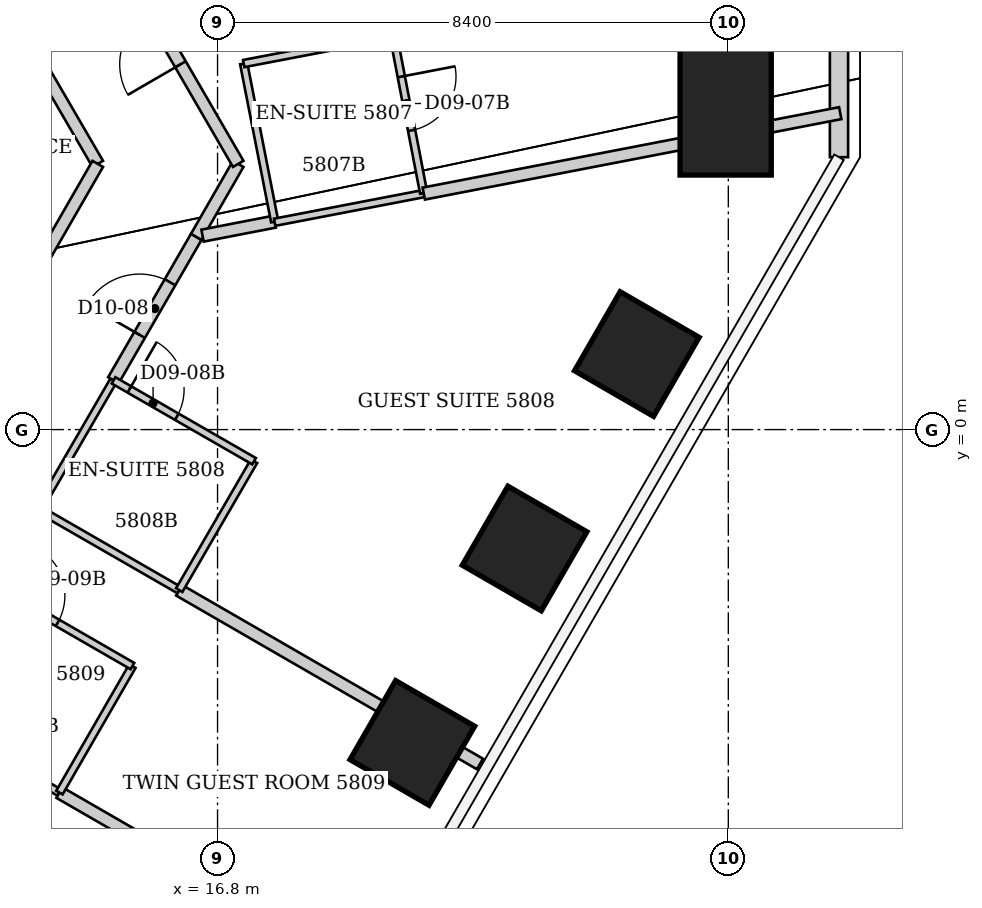
"""IFC4 building model, lengths in metres.
Left out: names, types, materials, properties, quantities, classifications, styles, units other than length and angle.
Written with IfcOpenShell. Run it as: python <this file> out.ifc"""

import sys

from ifc_helpers import new_model, si_unit, direction, frame, frame_2d, origin, origin_2d, place, context, subcontext, project, spatial, rectangle, extrude, element, fill, save


model = new_model("IFC4")
c1 = context("Model", 3, precision=1e-05, world=origin(), true_north=direction((0.0, 1.0)))
c2 = subcontext(c1, "Body", "Model", "MODEL_VIEW")
j1 = project(units=[si_unit("LENGTHUNIT", "METRE"), si_unit("PLANEANGLEUNIT", "RADIAN")], contexts=[c1])
p1 = place(None, origin())
s1 = spatial("IfcSite", under=j1, at=p1, CompositionType="ELEMENT")
p2 = place(p1, origin())
s2 = spatial("IfcBuilding", under=s1, at=p2, CompositionType="ELEMENT")
p3 = place(p2, frame((0.0, 0.0, 232.6)))
s3 = spatial("IfcBuildingStorey", under=s2, at=p3, CompositionType="ELEMENT", Elevation=232.6)
p4 = place(p3, frame((25.156, 5.311, -0.069), z_axis=(-0.069494626315, -0.014666891242, 0.997474500534), x_axis=(0.997582322762, -0.001100831088, 0.069485951703)))
e1 = element("IfcColumn", 1, at=p4, inside=s3, PredefinedType="COLUMN", context=c2, shape_type="SweptSolid", body=[
    extrude(rectangle(XDim=1.5, YDim=2.25, at=origin_2d()), origin(), (0.0, 0.0, 1.0), 3.878),
])
p5 = place(p3, frame((23.696, 1.242, -0.068), z_axis=(-0.064946488334, -0.003401658943, 0.997882950235), x_axis=(0.86374544839, -0.500971680077, 0.05450849609)))
e2 = element("IfcColumn", 2, at=p5, inside=s3, PredefinedType="COLUMN", context=c2, shape_type="SweptSolid", body=[
    extrude(rectangle(XDim=1.5, YDim=1.5, at=origin_2d()), origin(), (0.0, 0.0, 1.0), 3.876),
])
p6 = place(p3, frame((21.85, -1.956, -0.06), z_axis=(-0.059916592272, 0.005366607316, 0.998188960817), x_axis=(0.864010481445, -0.500509554821, 0.054553400319)))
e3 = element("IfcColumn", 3, at=p6, inside=s3, PredefinedType="COLUMN", context=c2, shape_type="SweptSolid", body=[
    extrude(rectangle(XDim=1.5, YDim=1.5, at=origin_2d()), origin(), (0.0, 0.0, 1.0), 3.867),
])
p7 = place(p3, frame((20.003, -5.153, -0.052), z_axis=(-0.054858228661, 0.014110017291, 0.998394452188), x_axis=(0.86451511653, -0.499636332881, 0.054563249145)))
e4 = element("IfcColumn", 4, at=p7, inside=s3, PredefinedType="COLUMN", context=c2, shape_type="SweptSolid", body=[
    extrude(rectangle(XDim=1.5, YDim=1.5, at=origin_2d()), origin(), (0.0, 0.0, 1.0), 3.858),
])
p8 = place(p3, frame((27.02, 6.25, 0.0), z_axis=(0.0, 0.0, 1.0), x_axis=(0.0, -1.0, 0.0)))
e5 = element("IfcWall", 5, at=p8, inside=s3, PredefinedType="SOLIDWALL", context=c2, shape_type="SweptSolid", body=[
    extrude(rectangle(XDim=1.77, YDim=0.3, at=frame_2d((0.885, 0.0))), origin(), (0.0, 0.0, 1.0), 3.64),
])
p9 = place(p3, frame((11.93, -4.66, 0.0), z_axis=(0.0, 0.0, 1.0), x_axis=(0.865969958829, -0.500096021185, 0.0)))
e6 = element("IfcWall", 6, at=p9, inside=s3, PredefinedType="PARTITIONING", context=c2, shape_type="SweptSolid", body=[
    extrude(rectangle(XDim=2.621, YDim=0.12, at=frame_2d((1.311, 0.0))), origin(), (0.0, 0.0, 1.0), 3.64),
])
p10 = place(p3, frame((13.83, 6.09, 0.0), z_axis=(0.0, 0.0, 1.0), x_axis=(0.502573539539, -0.864534462792, 0.0)))
e7 = element("IfcWall", 7, at=p10, inside=s3, PredefinedType="PARTITIONING", context=c2, shape_type="SweptSolid", body=[
    extrude(rectangle(XDim=1.99, YDim=0.2, at=frame_2d((0.995, 0.0))), origin(), (0.0, 0.0, 1.0), 3.64),
])
p11 = place(p3, frame((13.86, -1.31, 0.0), z_axis=(0.0, 0.0, 1.0), x_axis=(0.501813488763, 0.864975850817, 0.0)))
e8 = element("IfcWall", 8, at=p11, inside=s3, PredefinedType="PARTITIONING", context=c2, shape_type="SweptSolid", body=[
    extrude(rectangle(XDim=2.451, YDim=0.12, at=frame_2d((1.226, 0.0))), origin(), (0.0, 0.0, 1.0), 3.64),
])
p12 = place(p3, frame((14.2, -5.971, 0.0), z_axis=(0.0, 0.0, 1.0), x_axis=(0.86600340545, -0.500038100297, 0.0)))
e9 = element("IfcWall", 9, at=p12, inside=s3, PredefinedType="PARTITIONING", context=c2, shape_type="SweptSolid", body=[
    extrude(rectangle(XDim=5.758, YDim=0.2, at=frame_2d((2.879, 0.0))), origin(), (0.0, 0.0, 1.0), 3.64),
])
p13 = place(p3, frame((14.2, -5.97, 0.0), z_axis=(0.0, 0.0, 1.0), x_axis=(0.499737123639, 0.866177122335, 0.0)))
e10 = element("IfcWall", 10, at=p13, inside=s3, PredefinedType="PARTITIONING", context=c2, shape_type="SweptSolid", body=[
    extrude(rectangle(XDim=2.401, YDim=0.12, at=frame_2d((1.201, 0.0))), origin(), (0.0, 0.0, 1.0), 3.64),
])
p14 = place(p3, frame((14.83, 4.37, 0.0), z_axis=(0.0, 0.0, 1.0), x_axis=(-0.498775186059, -0.866731396554, 0.0)))
e11 = element("IfcWall", 11, at=p14, inside=s3, PredefinedType="PARTITIONING", context=c2, shape_type="SweptSolid", body=[
    extrude(rectangle(XDim=3.288, YDim=0.2, at=frame_2d((1.644, 0.0))), origin(), (0.0, 0.0, 1.0), 3.64),
])
p15 = place(p3, frame((15.088, 0.811, 0.0), z_axis=(0.0, 0.0, 1.0), x_axis=(0.500149166734, 0.8659392652, 0.0)))
e12 = element("IfcWall", 12, at=p15, inside=s3, PredefinedType="PARTITIONING", context=c2, shape_type="SweptSolid", body=[
    extrude(rectangle(XDim=2.724, YDim=0.2, at=frame_2d((1.362, 0.0))), origin(), (0.0, 0.0, 1.0), 3.64),
])
p16 = place(p15, frame((0.862, 0.0, 0.0)))
e13 = element("IfcOpeningElement", 13, at=p16, cuts=e12, PredefinedType="OPENING", context=c2, shape_type="SweptSolid", body=[
    extrude(rectangle(XDim=1.0, YDim=2.13, at=frame_2d((0.5, 1.065))), frame((0.0, 0.1, 0.0), z_axis=(0.0, -1.0, 0.0), x_axis=(1.0, 0.0, 0.0)), (0.0, 0.0, 1.0), 0.2),
])
p17 = place(p3, frame((15.4, -3.89, 0.0), z_axis=(0.0, 0.0, 1.0), x_axis=(-0.866154567199, 0.49977621564, 0.0)))
e14 = element("IfcWall", 14, at=p17, inside=s3, PredefinedType="PARTITIONING", context=c2, shape_type="SweptSolid", body=[
    extrude(rectangle(XDim=2.621, YDim=0.12, at=frame_2d((1.311, 0.0))), origin(), (0.0, 0.0, 1.0), 3.64),
])
p18 = place(p17, frame((1.421, 0.0, 0.0)))
e15 = element("IfcOpeningElement", 15, at=p18, cuts=e14, PredefinedType="OPENING", context=c2, shape_type="SweptSolid", body=[
    extrude(rectangle(XDim=0.9, YDim=2.03, at=frame_2d((0.45, 1.015))), frame((0.0, 0.06, 0.0), z_axis=(0.0, -1.0, 0.0), x_axis=(1.0, 0.0, 0.0)), (0.0, 0.0, 1.0), 0.12),
])
p19 = place(p3, frame((16.168, -2.643, 0.0), z_axis=(0.0, 0.0, 1.0), x_axis=(0.865980633471, -0.500077536441, 0.0)))
e16 = element("IfcWall", 16, at=p19, inside=s3, PredefinedType="PARTITIONING", context=c2, shape_type="SweptSolid", body=[
    extrude(rectangle(XDim=5.713, YDim=0.2, at=frame_2d((2.857, 0.0))), origin(), (0.0, 0.0, 1.0), 3.64),
])
p20 = place(p3, frame((16.17, -2.64, 0.0), z_axis=(0.0, 0.0, 1.0), x_axis=(-0.86663205897, 0.498947767172, 0.0)))
e17 = element("IfcWall", 17, at=p20, inside=s3, PredefinedType="PARTITIONING", context=c2, shape_type="SweptSolid", body=[
    extrude(rectangle(XDim=2.665, YDim=0.12, at=frame_2d((1.333, 0.0))), origin(), (0.0, 0.0, 1.0), 3.64),
])
p21 = place(p3, frame((16.17, -2.64, 0.0), z_axis=(0.0, 0.0, 1.0), x_axis=(0.501856726365, 0.86495076519, 0.0)))
e18 = element("IfcWall", 18, at=p21, inside=s3, PredefinedType="PARTITIONING", context=c2, shape_type="SweptSolid", body=[
    extrude(rectangle(XDim=2.451, YDim=0.12, at=frame_2d((1.226, 0.0))), origin(), (0.0, 0.0, 1.0), 3.64),
])
p22 = place(p3, frame((16.45, 3.17, 0.0), z_axis=(0.0, 0.0, 1.0), x_axis=(0.49845455473, 0.866915830325, 0.0)))
e19 = element("IfcWall", 19, at=p22, inside=s3, PredefinedType="PARTITIONING", context=c2, shape_type="SweptSolid", body=[
    extrude(rectangle(XDim=1.384, YDim=0.2, at=frame_2d((0.692, 0.0))), origin(), (0.0, 0.0, 1.0), 3.64),
])
p23 = place(p3, frame((16.553, 3.19, 0.0), z_axis=(0.0, 0.0, 1.0), x_axis=(0.981743377248, 0.19021025532, 0.0)))
e20 = element("IfcWall", 20, at=p23, inside=s3, PredefinedType="PARTITIONING", context=c2, shape_type="SweptSolid", body=[
    extrude(rectangle(XDim=1.209, YDim=0.2, at=frame_2d((0.604, 0.0))), origin(), (0.0, 0.0, 1.0), 3.64),
])
p24 = place(p3, frame((17.14, 4.37, 0.0), z_axis=(0.0, 0.0, 1.0), x_axis=(-0.501524901322, 0.865143209737, 0.0)))
e21 = element("IfcWall", 21, at=p24, inside=s3, PredefinedType="PARTITIONING", context=c2, shape_type="SweptSolid", body=[
    extrude(rectangle(XDim=4.785, YDim=0.2, at=frame_2d((2.393, 0.0))), origin(), (0.0, 0.0, 1.0), 3.64),
])
p25 = place(p24, frame((1.893, 0.0, 0.0)))
e22 = element("IfcOpeningElement", 22, at=p25, cuts=e21, PredefinedType="OPENING", context=c2, shape_type="SweptSolid", body=[
    extrude(rectangle(XDim=1.0, YDim=2.13, at=frame_2d((0.5, 1.065))), frame((0.0, 0.1, 0.0), z_axis=(0.0, -1.0, 0.0), x_axis=(1.0, 0.0, 0.0)), (0.0, 0.0, 1.0), 0.2),
])
p26 = place(p3, frame((17.23, 6.02, 0.0), z_axis=(0.0, 0.0, 1.0), x_axis=(0.192499717639, -0.981297028788, 0.0)))
e23 = element("IfcWall", 23, at=p26, inside=s3, PredefinedType="PARTITIONING", context=c2, shape_type="SweptSolid", body=[
    extrude(rectangle(XDim=2.649, YDim=0.12, at=frame_2d((1.325, 0.0))), origin(), (0.0, 0.0, 1.0), 3.64),
])
p27 = place(p3, frame((17.4, -0.52, 0.0), z_axis=(0.0, 0.0, 1.0), x_axis=(-0.866592449628, 0.499016559092, 0.0)))
e24 = element("IfcWall", 24, at=p27, inside=s3, PredefinedType="PARTITIONING", context=c2, shape_type="SweptSolid", body=[
    extrude(rectangle(XDim=2.665, YDim=0.12, at=frame_2d((1.333, 0.0))), origin(), (0.0, 0.0, 1.0), 3.64),
])
p28 = place(p27, frame((1.466, 0.0, 0.0)))
e25 = element("IfcOpeningElement", 25, at=p28, cuts=e24, PredefinedType="OPENING", context=c2, shape_type="SweptSolid", body=[
    extrude(rectangle(XDim=0.9, YDim=2.03, at=frame_2d((0.45, 1.015))), frame((0.0, 0.06, 0.0), z_axis=(0.0, -1.0, 0.0), x_axis=(1.0, 0.0, 0.0)), (0.0, 0.0, 1.0), 0.12),
])
p29 = place(p3, frame((17.74, 3.41, 0.0), z_axis=(0.0, 0.0, 1.0), x_axis=(0.981991098912, 0.188927186128, 0.0)))
e26 = element("IfcWall", 26, at=p29, inside=s3, PredefinedType="PARTITIONING", context=c2, shape_type="SweptSolid", body=[
    extrude(rectangle(XDim=2.497, YDim=0.12, at=frame_2d((1.248, 0.0))), origin(), (0.0, 0.0, 1.0), 3.64),
])
p30 = place(p3, frame((19.69, 6.49, 0.0), z_axis=(0.0, 0.0, 1.0), x_axis=(-0.98223517487, -0.187654100002, 0.0)))
e27 = element("IfcWall", 27, at=p30, inside=s3, PredefinedType="PARTITIONING", context=c2, shape_type="SweptSolid", body=[
    extrude(rectangle(XDim=2.504, YDim=0.12, at=frame_2d((1.252, 0.0))), origin(), (0.0, 0.0, 1.0), 3.64),
])
p31 = place(p3, frame((20.19, 3.89, 0.0), z_axis=(0.0, 0.0, 1.0), x_axis=(-0.188840553732, 0.982007762325, 0.0)))
e28 = element("IfcWall", 28, at=p31, inside=s3, PredefinedType="PARTITIONING", context=c2, shape_type="SweptSolid", body=[
    extrude(rectangle(XDim=2.648, YDim=0.12, at=frame_2d((1.324, 0.0))), origin(), (0.0, 0.0, 1.0), 3.64),
])
p32 = place(p31, frame((1.05, 0.0, 0.0)))
e29 = element("IfcOpeningElement", 29, at=p32, cuts=e28, PredefinedType="OPENING", context=c2, shape_type="SweptSolid", body=[
    extrude(rectangle(XDim=0.9, YDim=2.03, at=frame_2d((0.45, 1.015))), frame((0.0, 0.06, 0.0), z_axis=(0.0, -1.0, 0.0), x_axis=(1.0, 0.0, 0.0)), (0.0, 0.0, 1.0), 0.12),
])
p33 = place(p3, frame((20.192, 3.882, 0.0), z_axis=(0.0, 0.0, 1.0), x_axis=(0.981855599951, 0.189630115871, 0.0)))
e30 = element("IfcWall", 30, at=p33, inside=s3, PredefinedType="PARTITIONING", context=c2, shape_type="SweptSolid", body=[
    extrude(rectangle(XDim=6.975, YDim=0.2, at=frame_2d((3.488, 0.0))), origin(), (0.0, 0.0, 1.0), 3.64),
])
p34 = place(p25, origin())
e31 = element("IfcDoor", 31, at=p34, inside=s3, OperationType="SINGLE_SWING_LEFT", PredefinedType="DOOR", context=c2, shape_type="SweptSolid", body=[
    extrude(rectangle(XDim=1.0, YDim=2.13, at=frame_2d((0.5, 1.065))), frame((0.0, 0.025, 0.0), z_axis=(0.0, -1.0, 0.0), x_axis=(1.0, 0.0, 0.0)), (0.0, 0.0, 1.0), 0.05),
])
fill(e22, e31)
p35 = place(p32, origin())
e32 = element("IfcDoor", 32, at=p35, inside=s3, OperationType="SINGLE_SWING_RIGHT", PredefinedType="DOOR", context=c2, shape_type="SweptSolid", body=[
    extrude(rectangle(XDim=0.9, YDim=2.03, at=frame_2d((0.45, 1.015))), frame((0.0, 0.025, 0.0), z_axis=(0.0, -1.0, 0.0), x_axis=(1.0, 0.0, 0.0)), (0.0, 0.0, 1.0), 0.05),
])
fill(e29, e32)
p36 = place(p16, origin())
e33 = element("IfcDoor", 33, at=p36, inside=s3, OperationType="SINGLE_SWING_LEFT", PredefinedType="DOOR", context=c2, shape_type="SweptSolid", body=[
    extrude(rectangle(XDim=1.0, YDim=2.13, at=frame_2d((0.5, 1.065))), frame((0.0, 0.025, 0.0), z_axis=(0.0, -1.0, 0.0), x_axis=(1.0, 0.0, 0.0)), (0.0, 0.0, 1.0), 0.05),
])
fill(e13, e33)
p37 = place(p28, origin())
e34 = element("IfcDoor", 34, at=p37, inside=s3, OperationType="SINGLE_SWING_RIGHT", PredefinedType="DOOR", context=c2, shape_type="SweptSolid", body=[
    extrude(rectangle(XDim=0.9, YDim=2.03, at=frame_2d((0.45, 1.015))), frame((0.0, 0.025, 0.0), z_axis=(0.0, -1.0, 0.0), x_axis=(1.0, 0.0, 0.0)), (0.0, 0.0, 1.0), 0.05),
])
fill(e25, e34)
p38 = place(p18, origin())
e35 = element("IfcDoor", 35, at=p38, inside=s3, OperationType="SINGLE_SWING_RIGHT", PredefinedType="DOOR", context=c2, shape_type="SweptSolid", body=[
    extrude(rectangle(XDim=0.9, YDim=2.03, at=frame_2d((0.45, 1.015))), frame((0.0, 0.025, 0.0), z_axis=(0.0, -1.0, 0.0), x_axis=(1.0, 0.0, 0.0)), (0.0, 0.0, 1.0), 0.05),
])
fill(e15, e35)
save(model, sys.argv[1])
